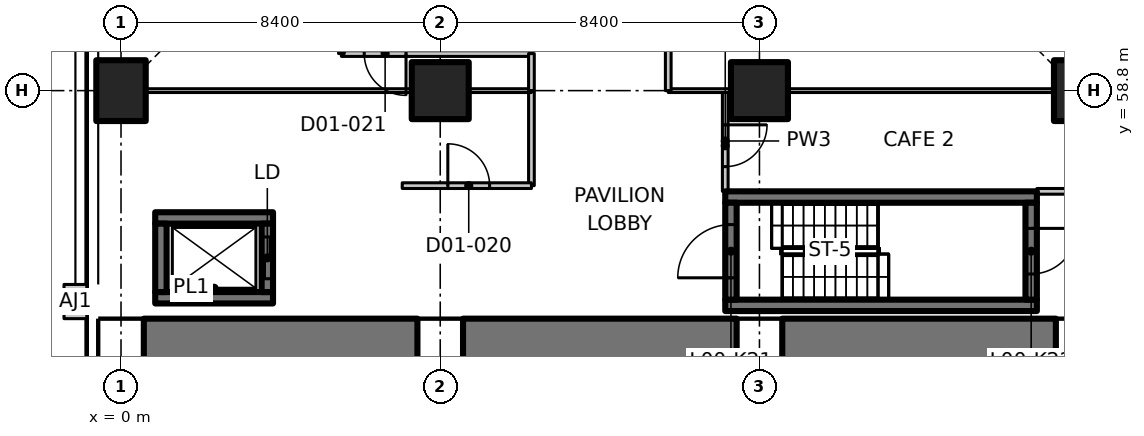
"""IFC4 building model, lengths in metres.
Left out: names, types, materials, properties, quantities, classifications, styles, units other than length and angle.
Written with IfcOpenShell. Run it as: python <this file> out.ifc"""

import sys

from ifc_helpers import new_model, si_unit, direction, frame, frame_2d, origin, origin_2d, place, context, subcontext, project, spatial, polyline, rectangle, outline, extrude, element, fill, save


model = new_model("IFC4")
c1 = context("Model", 3, precision=1e-05, world=origin(), true_north=direction((0.0, 1.0)))
c2 = subcontext(c1, "Body", "Model", "MODEL_VIEW")
j1 = project(units=[si_unit("LENGTHUNIT", "METRE"), si_unit("PLANEANGLEUNIT", "RADIAN")], contexts=[c1])
p1 = place(None, origin())
s1 = spatial("IfcSite", under=j1, at=p1, CompositionType="ELEMENT")
p2 = place(p1, origin())
s2 = spatial("IfcBuilding", under=s1, at=p2, CompositionType="ELEMENT")
p3 = place(p2, origin())
s3 = spatial("IfcBuildingStorey", under=s2, at=p3, CompositionType="ELEMENT", Elevation=0.0)
p4 = place(p3, frame((0.0, 58.8, 0.0), z_axis=(0.0, 0.0, 1.0), x_axis=(1.0, 0.0, 0.0)))
e1 = element("IfcColumn", 1, at=p4, inside=s3, PredefinedType="COLUMN", context=c2, shape_type="SweptSolid", body=[
    extrude(rectangle(XDim=1.3, YDim=1.6, at=origin_2d()), origin(), (0.0, 0.0, 1.0), 6.75),
])
for number, where, z_axis, x_axis in (
    (2, (8.4, 58.8, 0.0), (0.0, 0.0, 1.0), (1.0, 0.0, 0.0)),
    (3, (16.8, 58.8, 0.0), (0.0, 0.0, 1.0), (1.0, 0.0, 0.0)),
):
    element("IfcColumn", number, at=place(p3, frame(where, z_axis=z_axis, x_axis=x_axis)), inside=s3, PredefinedType="COLUMN", context=c2, shape_type="SweptSolid", body=[
        extrude(rectangle(XDim=1.5, YDim=1.5, at=origin_2d()), origin(), (0.0, 0.0, 1.0), 6.75),
    ])
p5 = place(p3, frame((25.2, 58.8, 0.0), z_axis=(0.0, 0.0, 1.0), x_axis=(1.0, 0.0, 0.0)))
e4 = element("IfcColumn", 4, at=p5, inside=s3, PredefinedType="COLUMN", context=c2, shape_type="SweptSolid", body=[
    extrude(rectangle(XDim=1.3, YDim=1.6, at=origin_2d()), origin(), (0.0, 0.0, 1.0), 6.75),
])
p6 = place(p3, frame((-0.6, 42.0, 0.0), z_axis=(1.0, 0.0, 0.0), x_axis=(0.0, 1.0, 0.0)))
e5 = element("IfcWall", 5, at=p6, inside=s3, PredefinedType="SOLIDWALL", context=c2, shape_type="SweptSolid", body=[
    extrude(outline(polyline([(-10.8, -6.3), (10.8, -6.3), (10.8, 36.25), (-10.8, 36.25), (-10.8, -6.3)]), holes=[polyline([(-8.4, 0.0), (-8.4, 26.6), (-8.36, 27.423), (-8.239, 28.239), (-8.038, 29.038), (-7.76, 29.814), (-7.408, 30.56), (-6.984, 31.267), (-6.493, 31.929), (-5.94, 32.54), (-5.329, 33.093), (-4.667, 33.584), (-3.96, 34.008), (-3.215, 34.361), (-2.438, 34.638), (-1.639, 34.839), (-0.823, 34.959), (0.0, 35.0), (0.823, 34.959), (1.639, 34.839), (2.438, 34.638), (3.215, 34.361), (3.96, 34.008), (4.667, 33.584), (5.329, 33.093), (5.94, 32.54), (6.493, 31.929), (6.984, 31.267), (7.408, 30.56), (7.76, 29.814), (8.038, 29.038), (8.239, 28.239), (8.36, 27.423), (8.4, 26.6), (8.4, 0.0), (-8.4, 0.0)])]), origin(), (0.0, 0.0, 1.0), 1.2),
])
for number, where, z_axis, x_axis in (
    (6, (7.8, 42.0, 0.0), (1.0, 0.0, 0.0), (0.0, 1.0, 0.0)),
    (7, (16.2, 42.0, 0.0), (1.0, 0.0, 0.0), (0.0, 1.0, 0.0)),
    (8, (24.6, 42.0, 0.0), (1.0, 0.0, 0.0), (0.0, 1.0, 0.0)),
):
    element("IfcWall", number, at=place(p3, frame(where, z_axis=z_axis, x_axis=x_axis)), inside=s3, PredefinedType="SOLIDWALL", context=c2, shape_type="SweptSolid", body=[
        extrude(outline(polyline([(-10.8, -6.3), (10.8, -6.3), (10.8, 36.25), (-10.8, 36.25), (-10.8, -6.3)]), holes=[polyline([(-8.4, 0.0), (-8.4, 26.6), (-8.36, 27.423), (-8.239, 28.239), (-8.038, 29.038), (-7.76, 29.814), (-7.408, 30.56), (-6.984, 31.267), (-6.493, 31.929), (-5.94, 32.54), (-5.329, 33.093), (-4.667, 33.584), (-3.96, 34.008), (-3.215, 34.361), (-2.438, 34.638), (-1.639, 34.839), (-0.823, 34.959), (0.0, 35.0), (0.823, 34.959), (1.639, 34.839), (2.438, 34.638), (3.215, 34.361), (3.96, 34.008), (4.667, 33.584), (5.329, 33.093), (5.94, 32.54), (6.493, 31.929), (6.984, 31.267), (7.408, 30.56), (7.76, 29.814), (8.038, 29.038), (8.239, 28.239), (8.36, 27.423), (8.4, 26.6), (8.4, 0.0), (-8.4, 0.0)])]), origin(), (0.0, 0.0, 1.0), 1.2),
    ])
for number, where, z_axis, x_axis in (
    (9, (0.6, 51.6, -6.3), (0.0, 0.0, 1.0), (1.0, 0.0, 0.0)),
    (10, (9.0, 51.6, -6.3), (0.0, 0.0, 1.0), (1.0, 0.0, 0.0)),
):
    element("IfcWall", number, at=place(p3, frame(where, z_axis=z_axis, x_axis=x_axis)), inside=s3, PredefinedType="SOLIDWALL", context=c2, shape_type="SweptSolid", body=[
        extrude(rectangle(XDim=7.2, YDim=2.4, at=frame_2d((3.6, 0.0))), origin(), (0.0, 0.0, 1.0), 42.55),
    ])
p7 = place(p3, frame((17.4, 51.6, -6.3), z_axis=(0.0, 0.0, 1.0), x_axis=(1.0, 0.0, 0.0)))
e11 = element("IfcWall", 11, at=p7, inside=s3, PredefinedType="SOLIDWALL", context=c2, shape_type="SweptSolid", body=[
    extrude(rectangle(XDim=7.2, YDim=2.4, at=frame_2d((3.6, 0.0))), origin(), (0.0, 0.0, 1.0), 42.55),
])
p8 = place(p3, frame((-1.5, 42.0, 0.0), z_axis=(1.0, 0.0, 0.0), x_axis=(0.0, 1.0, 0.0)))
e12 = element("IfcWall", 12, at=p8, inside=s3, PredefinedType="SOLIDWALL", context=c2, shape_type="SweptSolid", body=[
    extrude(outline(polyline([(5.4, 35.953), (6.0, 35.58), (6.575, 35.168), (7.121, 34.72), (7.637, 34.237), (8.12, 33.721), (8.568, 33.175), (8.98, 32.6), (9.353, 32.0), (9.686, 31.377), (9.978, 30.733), (10.227, 30.072), (10.432, 29.395), (10.593, 28.707), (10.708, 28.01), (10.777, 27.306), (10.8, 26.6), (10.8, 0.0), (8.4, 0.0), (8.4, 26.6), (8.382, 27.149), (8.328, 27.696), (8.239, 28.239), (8.114, 28.774), (7.954, 29.3), (7.76, 29.814), (7.534, 30.315), (7.275, 30.8), (6.984, 31.267), (6.664, 31.714), (6.315, 32.138), (5.94, 32.54), (5.539, 32.915), (5.114, 33.264), (4.667, 33.584), (4.2, 33.875), (3.715, 34.134), (3.215, 34.361), (2.7, 34.554), (2.174, 34.714), (1.639, 34.839), (1.096, 34.928), (0.549, 34.982), (0.0, 35.0), (-0.549, 34.982), (-1.096, 34.928), (-1.639, 34.839), (-2.174, 34.714), (-2.7, 34.554), (-3.215, 34.361), (-3.715, 34.134), (-4.2, 33.875), (-4.667, 33.584), (-5.114, 33.264), (-5.539, 32.915), (-5.94, 32.54), (-6.315, 32.138), (-6.664, 31.714), (-6.984, 31.267), (-7.275, 30.8), (-7.534, 30.315), (-7.76, 29.814), (-7.954, 29.3), (-8.114, 28.774), (-8.239, 28.239), (-8.328, 27.696), (-8.382, 27.149), (-8.4, 26.6), (-8.4, 0.0), (-10.8, 0.0), (-10.8, 26.6), (-10.777, 27.306), (-10.708, 28.01), (-10.593, 28.707), (-10.432, 29.395), (-10.227, 30.072), (-9.978, 30.733), (-9.686, 31.377), (-9.353, 32.0), (-8.98, 32.6), (-8.568, 33.175), (-8.12, 33.721), (-7.637, 34.237), (-7.121, 34.72), (-6.575, 35.168), (-6.0, 35.58), (-5.4, 35.953), (-4.844, 36.25), (4.844, 36.25), (5.4, 35.953)])), origin(), (0.0, 0.0, 1.0), 0.9),
])
p9 = place(p3, frame((-4.1, 42.0, 0.0), z_axis=(1.0, 0.0, 0.0), x_axis=(0.0, 1.0, 0.0)))
e13 = element("IfcWall", 13, at=p9, inside=s3, PredefinedType="SOLIDWALL", context=c2, shape_type="SweptSolid", body=[
    extrude(outline(polyline([(13.304, 32.111), (13.636, 31.229), (13.909, 30.327), (14.123, 29.409), (14.277, 28.479), (14.369, 27.542), (14.4, 26.6), (14.4, 0.0), (8.4, 0.0), (8.4, 26.6), (8.382, 27.149), (8.328, 27.696), (8.239, 28.239), (8.114, 28.774), (7.954, 29.3), (7.76, 29.814), (7.534, 30.315), (7.275, 30.8), (6.984, 31.267), (6.664, 31.714), (6.315, 32.138), (5.94, 32.54), (5.539, 32.915), (5.114, 33.264), (4.667, 33.584), (4.2, 33.875), (3.715, 34.134), (3.215, 34.361), (2.7, 34.554), (2.174, 34.714), (1.639, 34.839), (1.096, 34.928), (0.549, 34.982), (0.0, 35.0), (-0.549, 34.982), (-1.096, 34.928), (-1.639, 34.839), (-2.174, 34.714), (-2.7, 34.554), (-3.215, 34.361), (-3.715, 34.134), (-4.2, 33.875), (-4.667, 33.584), (-5.114, 33.264), (-5.539, 32.915), (-5.94, 32.54), (-6.315, 32.138), (-6.664, 31.714), (-6.984, 31.267), (-7.275, 30.8), (-7.534, 30.315), (-7.76, 29.814), (-7.954, 29.3), (-8.114, 28.774), (-8.239, 28.239), (-8.328, 27.696), (-8.382, 27.149), (-8.4, 26.6), (-8.4, 0.0), (-14.4, 0.0), (-14.4, 26.6), (-14.369, 27.542), (-14.277, 28.479), (-14.123, 29.409), (-13.909, 30.327), (-13.636, 31.229), (-13.304, 32.111), (-13.241, 32.25), (-10.8, 32.25), (-10.8, 36.123), (-10.182, 36.782), (-9.495, 37.427), (-8.766, 38.024), (-8.0, 38.573), (-7.2, 39.071), (-6.369, 39.515), (-5.51, 39.904), (-4.629, 40.236), (-3.727, 40.509), (-2.809, 40.723), (-1.88, 40.877), (-0.942, 40.969), (0.0, 41.0), (0.942, 40.969), (1.88, 40.877), (2.809, 40.723), (3.727, 40.509), (4.629, 40.236), (5.51, 39.904), (6.369, 39.515), (7.2, 39.071), (8.0, 38.573), (8.766, 38.024), (9.495, 37.427), (10.182, 36.782), (10.8, 36.123), (10.8, 32.25), (13.241, 32.25), (13.304, 32.111)])), origin(), (0.0, 0.0, 1.0), 2.6),
])
p10 = place(p3, frame((-1.2, 52.8, 0.0), z_axis=(0.0, 0.0, 1.0), x_axis=(0.0, 1.0, 0.0)))
e14 = element("IfcWall", 14, at=p10, inside=s3, PredefinedType="SOLIDWALL", context=c2, shape_type="SweptSolid", body=[
    extrude(rectangle(XDim=0.9, YDim=0.6, at=frame_2d((0.45, 0.0))), origin(), (0.0, 0.0, 1.0), 36.23),
])
for number, where, z_axis, x_axis in (
    (15, (0.9, 53.35, 0.0), (0.0, 0.0, 1.0), (1.0, 0.0, 0.0)),
    (16, (0.9, 55.45, 0.0), (0.0, 0.0, 1.0), (1.0, 0.0, 0.0)),
):
    element("IfcWall", number, at=place(p3, frame(where, z_axis=z_axis, x_axis=x_axis)), inside=s3, PredefinedType="SHEAR", context=c2, shape_type="SweptSolid", body=[
        extrude(rectangle(XDim=3.1, YDim=0.3, at=frame_2d((1.55, 0.0))), origin(), (0.0, 0.0, 1.0), 6.75),
    ])
p11 = place(p3, frame((1.05, 53.5, 0.0), z_axis=(0.0, 0.0, 1.0), x_axis=(0.0, 1.0, 0.0)))
e17 = element("IfcWall", 17, at=p11, inside=s3, PredefinedType="SHEAR", context=c2, shape_type="SweptSolid", body=[
    extrude(rectangle(XDim=1.8, YDim=0.3, at=frame_2d((0.9, 0.0))), origin(), (0.0, 0.0, 1.0), 6.75),
])
p12 = place(p3, frame((3.85, 53.5, 0.0), z_axis=(0.0, 0.0, 1.0), x_axis=(0.0, 1.0, 0.0)))
e18 = element("IfcWall", 18, at=p12, inside=s3, PredefinedType="SHEAR", context=c2, shape_type="SweptSolid", body=[
    extrude(rectangle(XDim=1.8, YDim=0.3, at=frame_2d((0.9, 0.0))), origin(), (0.0, 0.0, 1.0), 6.75),
])
p13 = place(p12, frame((0.35, 0.0, 0.0)))
e19 = element("IfcOpeningElement", 19, at=p13, cuts=e18, PredefinedType="OPENING", context=c2, shape_type="SweptSolid", body=[
    extrude(rectangle(XDim=1.1, YDim=2.3, at=frame_2d((0.55, 1.15))), frame((0.0, 0.16, 0.0), z_axis=(0.0, -1.0, 0.0), x_axis=(1.0, 0.0, 0.0)), (0.0, 0.0, 1.0), 0.32),
])
for number, where, z_axis, x_axis in (
    (20, (15.9, 53.15, 0.0), (0.0, 0.0, 1.0), (1.0, 0.0, 0.0)),
    (21, (15.9, 56.0, 0.0), (0.0, 0.0, 1.0), (1.0, 0.0, 0.0)),
):
    element("IfcWall", number, at=place(p3, frame(where, z_axis=z_axis, x_axis=x_axis)), inside=s3, PredefinedType="SHEAR", context=c2, shape_type="SweptSolid", body=[
        extrude(rectangle(XDim=8.2, YDim=0.3, at=frame_2d((4.1, 0.0))), origin(), (0.0, 0.0, 1.0), 6.75),
    ])
p14 = place(p3, frame((16.05, 53.3, 0.0), z_axis=(0.0, 0.0, 1.0), x_axis=(0.0, 1.0, 0.0)))
e22 = element("IfcWall", 22, at=p14, inside=s3, PredefinedType="SHEAR", context=c2, shape_type="SweptSolid", body=[
    extrude(rectangle(XDim=2.55, YDim=0.3, at=frame_2d((1.275, 0.0))), origin(), (0.0, 0.0, 1.0), 6.75),
])
p15 = place(p14, frame((0.575, 0.0, 0.0)))
e23 = element("IfcOpeningElement", 23, at=p15, cuts=e22, PredefinedType="OPENING", context=c2, shape_type="SweptSolid", body=[
    extrude(rectangle(XDim=1.4, YDim=2.1, at=frame_2d((0.7, 1.05))), frame((0.0, 0.16, 0.0), z_axis=(0.0, -1.0, 0.0), x_axis=(1.0, 0.0, 0.0)), (0.0, 0.0, 1.0), 0.32),
])
p16 = place(p3, frame((23.95, 55.85, 0.0), z_axis=(0.0, 0.0, 1.0), x_axis=(0.0, -1.0, 0.0)))
e24 = element("IfcWall", 24, at=p16, inside=s3, PredefinedType="SHEAR", context=c2, shape_type="SweptSolid", body=[
    extrude(rectangle(XDim=2.55, YDim=0.3, at=frame_2d((1.275, 0.0))), origin(), (0.0, 0.0, 1.0), 6.75),
])
p17 = place(p16, frame((0.675, 0.0, 0.0)))
e25 = element("IfcOpeningElement", 25, at=p17, cuts=e24, PredefinedType="OPENING", context=c2, shape_type="SweptSolid", body=[
    extrude(rectangle(XDim=1.2, YDim=2.1, at=frame_2d((0.6, 1.05))), frame((0.0, 0.16, 0.0), z_axis=(0.0, -1.0, 0.0), x_axis=(1.0, 0.0, 0.0)), (0.0, 0.0, 1.0), 0.32),
])
p18 = place(p3, frame((24.1, 56.15, 0.0), z_axis=(0.0, 0.0, 1.0), x_axis=(1.0, 0.0, 0.0)))
e26 = element("IfcWall", 26, at=p18, inside=s3, PredefinedType="PARTITIONING", context=c2, shape_type="SweptSolid", body=[
    extrude(rectangle(XDim=2.0, YDim=0.15, at=frame_2d((1.0, 0.0))), origin(), (0.0, 0.0, 1.0), 6.73),
])
p19 = place(p3, frame((10.8, 56.3, 0.0), z_axis=(0.0, 0.0, 1.0), x_axis=(0.0, 1.0, 0.0)))
e27 = element("IfcWall", 27, at=p19, inside=s3, PredefinedType="PARTITIONING", context=c2, shape_type="SweptSolid", body=[
    extrude(rectangle(XDim=2.5, YDim=0.15, at=frame_2d((1.25, 0.0))), origin(), (0.0, 0.0, 1.0), 6.73),
])
p20 = place(p3, frame((15.9, 58.8, 0.0), z_axis=(0.0, 0.0, 1.0), x_axis=(0.0, -1.0, 0.0)))
e28 = element("IfcWall", 28, at=p20, inside=s3, PredefinedType="PARTITIONING", context=c2, shape_type="SweptSolid", body=[
    extrude(rectangle(XDim=2.65, YDim=0.15, at=frame_2d((1.325, 0.0))), origin(), (0.0, 0.0, 1.0), 6.73),
])
p21 = place(p20, frame((0.9, 0.0, 0.0)))
e29 = element("IfcOpeningElement", 29, at=p21, cuts=e28, PredefinedType="OPENING", context=c2, shape_type="SweptSolid", body=[
    extrude(rectangle(XDim=1.1, YDim=2.1, at=frame_2d((0.55, 1.05))), frame((0.0, 0.085, 0.0), z_axis=(0.0, -1.0, 0.0), x_axis=(1.0, 0.0, 0.0)), (0.0, 0.0, 1.0), 0.17),
])
p22 = place(p3, frame((10.8, 59.775, 0.0), z_axis=(0.0, 0.0, 1.0), x_axis=(-1.0, 0.0, 0.0)))
e30 = element("IfcWall", 30, at=p22, inside=s3, PredefinedType="PARTITIONING", context=c2, shape_type="SweptSolid", body=[
    extrude(rectangle(XDim=5.0, YDim=0.15, at=frame_2d((2.5, 0.0))), origin(), (0.0, 0.0, 1.0), 6.73),
])
p23 = place(p22, frame((3.3, 0.0, 0.0)))
e31 = element("IfcOpeningElement", 31, at=p23, cuts=e30, PredefinedType="OPENING", context=c2, shape_type="SweptSolid", body=[
    extrude(rectangle(XDim=1.1, YDim=2.1, at=frame_2d((0.55, 1.05))), frame((0.0, 0.085, 0.0), z_axis=(0.0, -1.0, 0.0), x_axis=(1.0, 0.0, 0.0)), (0.0, 0.0, 1.0), 0.17),
])
p24 = place(p3, frame((5.8, 59.775, 0.0), z_axis=(0.0, 0.0, 1.0), x_axis=(0.0, 1.0, 0.0)))
e32 = element("IfcWall", 32, at=p24, inside=s3, PredefinedType="PARTITIONING", context=c2, shape_type="SweptSolid", body=[
    extrude(rectangle(XDim=3.225, YDim=0.15, at=frame_2d((1.613, 0.0))), origin(), (0.0, 0.0, 1.0), 6.73),
])
p25 = place(p3, frame((7.4, 56.3, 0.0), z_axis=(0.0, 0.0, 1.0), x_axis=(1.0, 0.0, 0.0)))
e33 = element("IfcWall", 33, at=p25, inside=s3, PredefinedType="PARTITIONING", context=c2, shape_type="SweptSolid", body=[
    extrude(rectangle(XDim=3.4, YDim=0.15, at=frame_2d((1.7, 0.0))), origin(), (0.0, 0.0, 1.0), 6.73),
])
p26 = place(p25, frame((1.2, 0.0, 0.0)))
e34 = element("IfcOpeningElement", 34, at=p26, cuts=e33, PredefinedType="OPENING", context=c2, shape_type="SweptSolid", body=[
    extrude(rectangle(XDim=1.1, YDim=2.1, at=frame_2d((0.55, 1.05))), frame((0.0, 0.085, 0.0), z_axis=(0.0, -1.0, 0.0), x_axis=(1.0, 0.0, 0.0)), (0.0, 0.0, 1.0), 0.17),
])
p27 = place(p3, frame((0.67, 58.8, 0.0), z_axis=(0.0, 0.0, 1.0), x_axis=(1.0, 0.0, 0.0)))
e35 = element("IfcWall", 35, at=p27, inside=s3, PredefinedType="PARTITIONING", context=c2, shape_type="SweptSolid", body=[
    extrude(rectangle(XDim=6.96, YDim=0.1, at=frame_2d((3.48, 0.0))), origin(), (0.0, 0.0, 1.0), 6.73),
])
p28 = place(p3, frame((9.17, 58.8, 0.0), z_axis=(0.0, 0.0, 1.0), x_axis=(1.0, 0.0, 0.0)))
e36 = element("IfcWall", 36, at=p28, inside=s3, PredefinedType="PARTITIONING", context=c2, shape_type="SweptSolid", body=[
    extrude(rectangle(XDim=1.63, YDim=0.1, at=frame_2d((0.815, 0.0))), origin(), (0.0, 0.0, 1.0), 6.73),
])
p29 = place(p3, frame((10.8, 59.775, 0.0), z_axis=(0.0, 0.0, 1.0), x_axis=(0.0, -1.0, 0.0)))
e37 = element("IfcWall", 37, at=p29, inside=s3, PredefinedType="PARTITIONING", context=c2, shape_type="SweptSolid", body=[
    extrude(rectangle(XDim=0.975, YDim=0.15, at=frame_2d((0.487, 0.0))), origin(), (0.0, 0.0, 1.0), 6.73),
])
p30 = place(p3, frame((14.4, 58.8, 0.0), z_axis=(0.0, 0.0, 1.0), x_axis=(1.0, 0.0, 0.0)))
e38 = element("IfcWall", 38, at=p30, inside=s3, PredefinedType="PARTITIONING", context=c2, shape_type="SweptSolid", body=[
    extrude(rectangle(XDim=1.63, YDim=0.1, at=frame_2d((0.815, 0.0))), origin(), (0.0, 0.0, 1.0), 6.73),
])
p31 = place(p3, frame((17.57, 58.8, 0.0), z_axis=(0.0, 0.0, 1.0), x_axis=(1.0, 0.0, 0.0)))
e39 = element("IfcWall", 39, at=p31, inside=s3, PredefinedType="PARTITIONING", context=c2, shape_type="SweptSolid", body=[
    extrude(rectangle(XDim=6.96, YDim=0.1, at=frame_2d((3.48, 0.0))), origin(), (0.0, 0.0, 1.0), 6.73),
])
p32 = place(p3, frame((14.4, 58.8, 0.0), z_axis=(0.0, 0.0, 1.0), x_axis=(0.0, 1.0, 0.0)))
e40 = element("IfcWall", 40, at=p32, inside=s3, PredefinedType="PARTITIONING", context=c2, shape_type="SweptSolid", body=[
    extrude(rectangle(XDim=2.8, YDim=0.15, at=frame_2d((1.4, 0.0))), origin(), (0.0, 0.0, 1.0), 6.73),
])
p33 = place(p13, origin())
e41 = element("IfcDoor", 41, at=p33, inside=s3, OperationType="SLIDING_TO_LEFT", PredefinedType="DOOR", context=c2, shape_type="SweptSolid", body=[
    extrude(rectangle(XDim=1.1, YDim=2.3, at=frame_2d((0.55, 1.15))), frame((0.0, 0.025, 0.0), z_axis=(0.0, -1.0, 0.0), x_axis=(1.0, 0.0, 0.0)), (0.0, 0.0, 1.0), 0.05),
])
fill(e19, e41)
p34 = place(p15, origin())
e42 = element("IfcDoor", 42, at=p34, inside=s3, OperationType="SINGLE_SWING_RIGHT", PredefinedType="DOOR", context=c2, shape_type="SweptSolid", body=[
    extrude(rectangle(XDim=1.4, YDim=2.1, at=frame_2d((0.7, 1.05))), frame((0.0, 0.025, 0.0), z_axis=(0.0, -1.0, 0.0), x_axis=(1.0, 0.0, 0.0)), (0.0, 0.0, 1.0), 0.05),
])
fill(e23, e42)
p35 = place(p17, origin())
e43 = element("IfcDoor", 43, at=p35, inside=s3, OperationType="SINGLE_SWING_LEFT", PredefinedType="DOOR", context=c2, shape_type="SweptSolid", body=[
    extrude(rectangle(XDim=1.2, YDim=2.1, at=frame_2d((0.6, 1.05))), frame((0.0, 0.025, 0.0), z_axis=(0.0, -1.0, 0.0), x_axis=(1.0, 0.0, 0.0)), (0.0, 0.0, 1.0), 0.05),
])
fill(e25, e43)
p36 = place(p26, origin())
e44 = element("IfcDoor", 44, at=p36, inside=s3, OperationType="SINGLE_SWING_LEFT", PredefinedType="DOOR", context=c2, shape_type="SweptSolid", body=[
    extrude(rectangle(XDim=1.1, YDim=2.1, at=frame_2d((0.55, 1.05))), frame((0.0, 0.025, 0.0), z_axis=(0.0, -1.0, 0.0), x_axis=(1.0, 0.0, 0.0)), (0.0, 0.0, 1.0), 0.05),
])
fill(e34, e44)
p37 = place(p23, origin())
e45 = element("IfcDoor", 45, at=p37, inside=s3, OperationType="SINGLE_SWING_LEFT", PredefinedType="DOOR", context=c2, shape_type="SweptSolid", body=[
    extrude(rectangle(XDim=1.1, YDim=2.1, at=frame_2d((0.55, 1.05))), frame((0.0, 0.025, 0.0), z_axis=(0.0, -1.0, 0.0), x_axis=(1.0, 0.0, 0.0)), (0.0, 0.0, 1.0), 0.05),
])
fill(e31, e45)
p38 = place(p21, origin())
e46 = element("IfcDoor", 46, at=p38, inside=s3, OperationType="SINGLE_SWING_LEFT", PredefinedType="DOOR", context=c2, shape_type="SweptSolid", body=[
    extrude(rectangle(XDim=1.1, YDim=2.1, at=frame_2d((0.55, 1.05))), frame((0.0, 0.025, 0.0), z_axis=(0.0, -1.0, 0.0), x_axis=(1.0, 0.0, 0.0)), (0.0, 0.0, 1.0), 0.05),
])
fill(e29, e46)
save(model, sys.argv[1])
